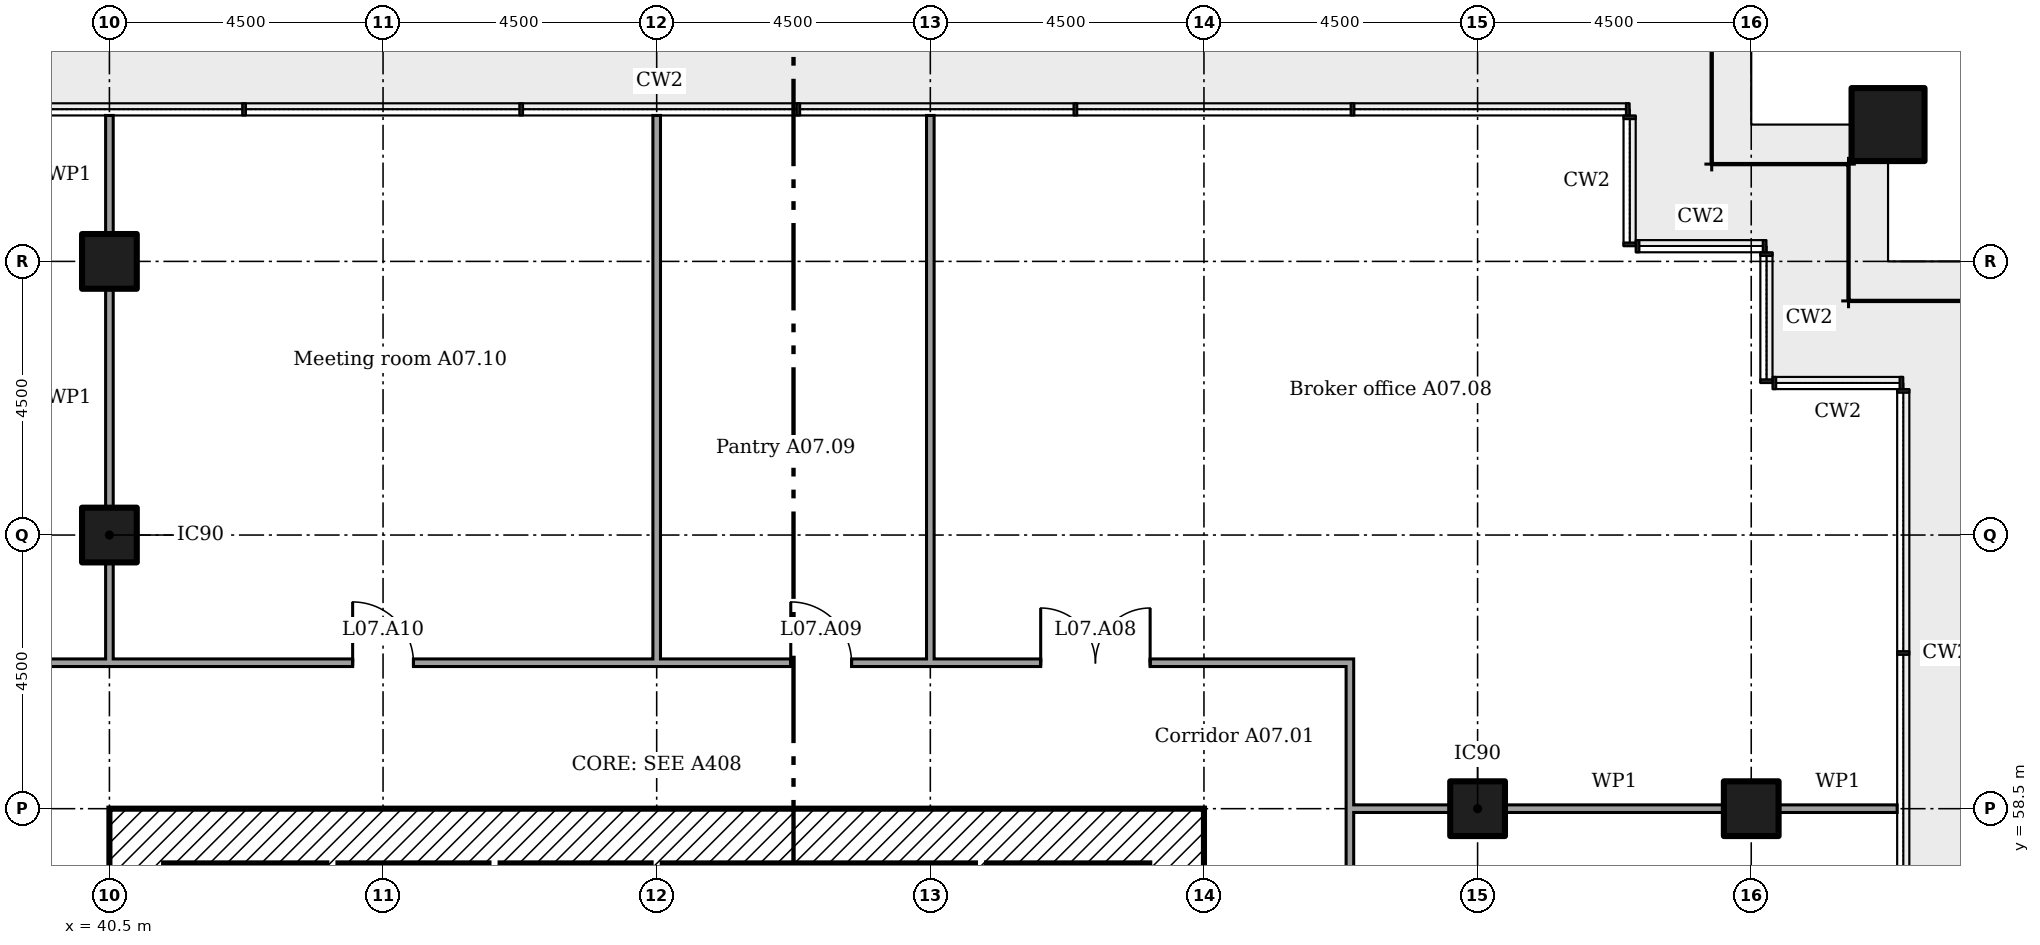
"""IFC4 building model, lengths in metres.
Left out: names, types, materials, properties, quantities, classifications, styles, units other than length and angle.
Written with IfcOpenShell. Run it as: python <this file> out.ifc"""

import sys

from ifc_helpers import new_model, si_unit, direction, frame, frame_2d, origin, origin_2d, place, context, subcontext, project, spatial, rectangle, extrude, element, fill, save


model = new_model("IFC4")
c1 = context("Model", 3, precision=1e-05, world=origin(), true_north=direction((0.0, 1.0)))
c2 = subcontext(c1, "Body", "Model", "MODEL_VIEW")
j1 = project(units=[si_unit("LENGTHUNIT", "METRE"), si_unit("PLANEANGLEUNIT", "RADIAN")], contexts=[c1])
p1 = place(None, origin())
s1 = spatial("IfcSite", under=j1, at=p1, CompositionType="ELEMENT")
p2 = place(p1, origin())
s2 = spatial("IfcBuilding", under=s1, at=p2, CompositionType="ELEMENT")
p3 = place(p2, frame((0.0, 0.0, 34.2)))
s3 = spatial("IfcBuildingStorey", under=s2, at=p3, CompositionType="ELEMENT", Elevation=34.2)
p4 = place(p3, frame((69.75, 69.75, 0.0)))
e1 = element("IfcColumn", 1, at=p4, inside=s3, PredefinedType="COLUMN", context=c2, shape_type="SweptSolid", body=[
    extrude(rectangle(XDim=1.2, YDim=1.2, at=origin_2d()), origin(), (0.0, 0.0, 1.0), 4.4),
])
for number, where in (
    (2, (40.5, 63.0, 0.0)),
    (3, (40.5, 67.5, 0.0)),
    (4, (63.0, 58.5, 0.0)),
    (5, (67.5, 58.5, 0.0)),
):
    element("IfcColumn", number, at=place(p3, frame(where)), inside=s3, PredefinedType="COLUMN", context=c2, shape_type="SweptSolid", body=[
        extrude(rectangle(XDim=0.9, YDim=0.9, at=origin_2d()), origin(), (0.0, 0.0, 1.0), 4.4),
    ])
p5 = place(p3, frame((58.05, 40.5, 0.0), z_axis=(0.0, 0.0, 1.0), x_axis=(0.0, 1.0, 0.0)))
e6 = element("IfcWall", 6, at=p5, inside=s3, PredefinedType="SHEAR", context=c2, shape_type="SweptSolid", body=[
    extrude(rectangle(XDim=18.0, YDim=0.9, at=frame_2d((9.0, 0.0))), origin(), (0.0, 0.0, 1.0), 4.125),
])
p6 = place(p5, frame((13.15, 0.0, 0.0)))
e7 = element("IfcOpeningElement", 7, at=p6, cuts=e6, PredefinedType="OPENING", context=c2, shape_type="SweptSolid", body=[
    extrude(rectangle(XDim=1.2, YDim=2.1, at=frame_2d((0.6, 1.05))), frame((0.0, 0.46, 0.0), z_axis=(0.0, -1.0, 0.0), x_axis=(1.0, 0.0, 0.0)), (0.0, 0.0, 1.0), 0.92),
])
p7 = place(p5, frame((3.9, 0.0, 0.0)))
e8 = element("IfcOpeningElement", 8, at=p7, cuts=e6, PredefinedType="OPENING", context=c2, shape_type="SweptSolid", body=[
    extrude(rectangle(XDim=1.8, YDim=2.1, at=frame_2d((0.9, 1.05))), frame((0.0, 0.46, 0.0), z_axis=(0.0, -1.0, 0.0), x_axis=(1.0, 0.0, 0.0)), (0.0, 0.0, 1.0), 0.92),
])
p8 = place(p5, frame((11.525, 0.0, 0.0)))
e9 = element("IfcOpeningElement", 9, at=p8, cuts=e6, PredefinedType="OPENING", context=c2, shape_type="SweptSolid", body=[
    extrude(rectangle(XDim=1.0, YDim=2.1, at=frame_2d((0.5, 1.05))), frame((0.0, 0.46, 0.0), z_axis=(0.0, -1.0, 0.0), x_axis=(1.0, 0.0, 0.0)), (0.0, 0.0, 1.0), 0.92),
])
p9 = place(p3, frame((41.4, 58.05, 0.0)))
e10 = element("IfcWall", 10, at=p9, inside=s3, PredefinedType="SHEAR", context=c2, shape_type="SweptSolid", body=[
    extrude(rectangle(XDim=16.2, YDim=0.9, at=frame_2d((8.1, 0.0))), origin(), (0.0, 0.0, 1.0), 4.125),
])
p10 = place(p3, frame((40.95, 40.5, 0.0), z_axis=(0.0, 0.0, 1.0), x_axis=(0.0, 1.0, 0.0)))
e11 = element("IfcWall", 11, at=p10, inside=s3, PredefinedType="SHEAR", context=c2, shape_type="SweptSolid", body=[
    extrude(rectangle(XDim=18.0, YDim=0.9, at=frame_2d((9.0, 0.0))), origin(), (0.0, 0.0, 1.0), 4.125),
])
p11 = place(p10, frame((3.65, 0.0, 0.0)))
e12 = element("IfcOpeningElement", 12, at=p11, cuts=e11, PredefinedType="OPENING", context=c2, shape_type="SweptSolid", body=[
    extrude(rectangle(XDim=1.2, YDim=2.1, at=frame_2d((0.6, 1.05))), frame((0.0, 0.46, 0.0), z_axis=(0.0, -1.0, 0.0), x_axis=(1.0, 0.0, 0.0)), (0.0, 0.0, 1.0), 0.92),
])
p12 = place(p10, frame((5.475, 0.0, 0.0)))
e13 = element("IfcOpeningElement", 13, at=p12, cuts=e11, PredefinedType="OPENING", context=c2, shape_type="SweptSolid", body=[
    extrude(rectangle(XDim=1.0, YDim=2.1, at=frame_2d((0.5, 1.05))), frame((0.0, 0.46, 0.0), z_axis=(0.0, -1.0, 0.0), x_axis=(1.0, 0.0, 0.0)), (0.0, 0.0, 1.0), 0.92),
])
p13 = place(p10, frame((12.3, 0.0, 0.0)))
e14 = element("IfcOpeningElement", 14, at=p13, cuts=e11, PredefinedType="OPENING", context=c2, shape_type="SweptSolid", body=[
    extrude(rectangle(XDim=1.0, YDim=2.1, at=frame_2d((0.5, 1.05))), frame((0.0, 0.46, 0.0), z_axis=(0.0, -1.0, 0.0), x_axis=(1.0, 0.0, 0.0)), (0.0, 0.0, 1.0), 0.92),
])
p14 = place(p3, frame((44.167, 57.6, 0.0), z_axis=(0.0, 0.0, 1.0), x_axis=(0.0, -1.0, 0.0)))
e15 = element("IfcWall", 15, at=p14, inside=s3, PredefinedType="SHEAR", context=c2, shape_type="SweptSolid", body=[
    extrude(rectangle(XDim=3.2, YDim=0.2, at=frame_2d((1.6, 0.0))), origin(), (0.0, 0.0, 1.0), 4.125),
])
p15 = place(p3, frame((46.833, 57.6, 0.0), z_axis=(0.0, 0.0, 1.0), x_axis=(0.0, -1.0, 0.0)))
e16 = element("IfcWall", 16, at=p15, inside=s3, PredefinedType="SHEAR", context=c2, shape_type="SweptSolid", body=[
    extrude(rectangle(XDim=4.3, YDim=0.2, at=frame_2d((2.15, 0.0))), origin(), (0.0, 0.0, 1.0), 4.125),
])
for number, where, z_axis, x_axis in (
    (17, (49.5, 57.6, 0.0), (0.0, 0.0, 1.0), (0.0, -1.0, 0.0)),
    (18, (54.833, 57.6, 0.0), (0.0, 0.0, 1.0), (0.0, -1.0, 0.0)),
):
    element("IfcWall", number, at=place(p3, frame(where, z_axis=z_axis, x_axis=x_axis)), inside=s3, PredefinedType="SHEAR", context=c2, shape_type="SweptSolid", body=[
        extrude(rectangle(XDim=2.4, YDim=0.2, at=frame_2d((1.2, 0.0))), origin(), (0.0, 0.0, 1.0), 4.125),
    ])
p16 = place(p3, frame((60.9, 58.5, 0.0)))
e19 = element("IfcWall", 19, at=p16, inside=s3, PredefinedType="PARTITIONING", context=c2, shape_type="SweptSolid", body=[
    extrude(rectangle(XDim=1.65, YDim=0.125, at=frame_2d((0.825, 0.0))), origin(), (0.0, 0.0, 1.0), 3.302),
])
p17 = place(p3, frame((63.45, 58.5, 0.0)))
e20 = element("IfcWall", 20, at=p17, inside=s3, PredefinedType="PARTITIONING", context=c2, shape_type="SweptSolid", body=[
    extrude(rectangle(XDim=3.6, YDim=0.125, at=frame_2d((1.8, 0.0))), origin(), (0.0, 0.0, 1.0), 3.302),
])
p18 = place(p3, frame((67.95, 58.5, 0.0)))
e21 = element("IfcWall", 21, at=p18, inside=s3, PredefinedType="PARTITIONING", context=c2, shape_type="SweptSolid", body=[
    extrude(rectangle(XDim=1.95, YDim=0.125, at=frame_2d((0.975, 0.0))), origin(), (0.0, 0.0, 1.0), 3.302),
])
p19 = place(p3, frame((38.038, 60.9, 0.0)))
e22 = element("IfcWall", 22, at=p19, inside=s3, PredefinedType="PARTITIONING", context=c2, shape_type="SweptSolid", body=[
    extrude(rectangle(XDim=22.925, YDim=0.125, at=frame_2d((11.462, 0.0))), origin(), (0.0, 0.0, 1.0), 4.225),
])
p20 = place(p19, frame((17.778, 0.0, 0.0)))
e23 = element("IfcOpeningElement", 23, at=p20, cuts=e22, PredefinedType="OPENING", context=c2, shape_type="SweptSolid", body=[
    extrude(rectangle(XDim=1.8, YDim=2.1, at=frame_2d((0.9, 1.05))), frame((0.0, 0.073, 0.0), z_axis=(0.0, -1.0, 0.0), x_axis=(1.0, 0.0, 0.0)), (0.0, 0.0, 1.0), 0.145),
])
p21 = place(p19, frame((13.667, 0.0, 0.0)))
e24 = element("IfcOpeningElement", 24, at=p21, cuts=e22, PredefinedType="OPENING", context=c2, shape_type="SweptSolid", body=[
    extrude(rectangle(XDim=1.0, YDim=2.1, at=frame_2d((0.5, 1.05))), frame((0.0, 0.073, 0.0), z_axis=(0.0, -1.0, 0.0), x_axis=(1.0, 0.0, 0.0)), (0.0, 0.0, 1.0), 0.145),
])
p22 = place(p19, frame((6.462, 0.0, 0.0)))
e25 = element("IfcOpeningElement", 25, at=p22, cuts=e22, PredefinedType="OPENING", context=c2, shape_type="SweptSolid", body=[
    extrude(rectangle(XDim=1.0, YDim=2.1, at=frame_2d((0.5, 1.05))), frame((0.0, 0.073, 0.0), z_axis=(0.0, -1.0, 0.0), x_axis=(1.0, 0.0, 0.0)), (0.0, 0.0, 1.0), 0.145),
])
p23 = place(p3, frame((40.5, 60.9, 0.0), z_axis=(0.0, 0.0, 1.0), x_axis=(0.0, 1.0, 0.0)))
e26 = element("IfcWall", 26, at=p23, inside=s3, PredefinedType="PARTITIONING", context=c2, shape_type="SweptSolid", body=[
    extrude(rectangle(XDim=1.65, YDim=0.125, at=frame_2d((0.825, 0.0))), origin(), (0.0, 0.0, 1.0), 3.302),
])
p24 = place(p3, frame((40.5, 63.45, 0.0), z_axis=(0.0, 0.0, 1.0), x_axis=(0.0, 1.0, 0.0)))
e27 = element("IfcWall", 27, at=p24, inside=s3, PredefinedType="PARTITIONING", context=c2, shape_type="SweptSolid", body=[
    extrude(rectangle(XDim=3.6, YDim=0.125, at=frame_2d((1.8, 0.0))), origin(), (0.0, 0.0, 1.0), 3.302),
])
p25 = place(p3, frame((40.5, 67.95, 0.0), z_axis=(0.0, 0.0, 1.0), x_axis=(0.0, 1.0, 0.0)))
e28 = element("IfcWall", 28, at=p25, inside=s3, PredefinedType="PARTITIONING", context=c2, shape_type="SweptSolid", body=[
    extrude(rectangle(XDim=1.95, YDim=0.125, at=frame_2d((0.975, 0.0))), origin(), (0.0, 0.0, 1.0), 3.302),
])
for number, where, z_axis, x_axis in (
    (29, (49.5, 60.9, 0.0), (0.0, 0.0, 1.0), (0.0, 1.0, 0.0)),
    (30, (54.0, 60.9, 0.0), (0.0, 0.0, 1.0), (0.0, 1.0, 0.0)),
):
    element("IfcWall", number, at=place(p3, frame(where, z_axis=z_axis, x_axis=x_axis)), inside=s3, PredefinedType="PARTITIONING", context=c2, shape_type="SweptSolid", body=[
        extrude(rectangle(XDim=9.0, YDim=0.125, at=frame_2d((4.5, 0.0))), origin(), (0.0, 0.0, 1.0), 3.467),
    ])
p26 = place(p3, frame((60.9, 37.863, 0.0), z_axis=(0.0, 0.0, 1.0), x_axis=(0.0, 1.0, 0.0)))
e31 = element("IfcWall", 31, at=p26, inside=s3, PredefinedType="PARTITIONING", context=c2, shape_type="SweptSolid", body=[
    extrude(rectangle(XDim=22.975, YDim=0.125, at=frame_2d((11.487, 0.0))), origin(), (0.0, 0.0, 1.0), 4.225),
])
p27 = place(p26, frame((3.933, 0.0, 0.0)))
e32 = element("IfcOpeningElement", 32, at=p27, cuts=e31, PredefinedType="OPENING", context=c2, shape_type="SweptSolid", body=[
    extrude(rectangle(XDim=1.0, YDim=2.1, at=frame_2d((0.5, 1.05))), frame((0.0, 0.073, 0.0), z_axis=(0.0, -1.0, 0.0), x_axis=(1.0, 0.0, 0.0)), (0.0, 0.0, 1.0), 0.145),
])
p28 = place(p26, frame((9.343, 0.0, 0.0)))
e33 = element("IfcOpeningElement", 33, at=p28, cuts=e31, PredefinedType="OPENING", context=c2, shape_type="SweptSolid", body=[
    extrude(rectangle(XDim=1.0, YDim=2.1, at=frame_2d((0.5, 1.05))), frame((0.0, 0.073, 0.0), z_axis=(0.0, -1.0, 0.0), x_axis=(1.0, 0.0, 0.0)), (0.0, 0.0, 1.0), 0.145),
])
p29 = place(p26, frame((15.637, 0.0, 0.0)))
e34 = element("IfcOpeningElement", 34, at=p29, cuts=e31, PredefinedType="OPENING", context=c2, shape_type="SweptSolid", body=[
    extrude(rectangle(XDim=1.0, YDim=2.1, at=frame_2d((0.5, 1.05))), frame((0.0, 0.073, 0.0), z_axis=(0.0, -1.0, 0.0), x_axis=(1.0, 0.0, 0.0)), (0.0, 0.0, 1.0), 0.145),
])
p30 = place(p20, origin())
e35 = element("IfcDoor", 35, at=p30, inside=s3, OperationType="DOUBLE_DOOR_SINGLE_SWING", PredefinedType="DOOR", context=c2, shape_type="SweptSolid", body=[
    extrude(rectangle(XDim=1.8, YDim=2.1, at=frame_2d((0.9, 1.05))), frame((0.0, 0.025, 0.0), z_axis=(0.0, -1.0, 0.0), x_axis=(1.0, 0.0, 0.0)), (0.0, 0.0, 1.0), 0.05),
])
fill(e23, e35)
p31 = place(p21, origin())
e36 = element("IfcDoor", 36, at=p31, inside=s3, OperationType="SINGLE_SWING_RIGHT", PredefinedType="DOOR", context=c2, shape_type="SweptSolid", body=[
    extrude(rectangle(XDim=1.0, YDim=2.1, at=frame_2d((0.5, 1.05))), frame((0.0, 0.025, 0.0), z_axis=(0.0, -1.0, 0.0), x_axis=(1.0, 0.0, 0.0)), (0.0, 0.0, 1.0), 0.05),
])
fill(e24, e36)
p32 = place(p22, origin())
e37 = element("IfcDoor", 37, at=p32, inside=s3, OperationType="SINGLE_SWING_RIGHT", PredefinedType="DOOR", context=c2, shape_type="SweptSolid", body=[
    extrude(rectangle(XDim=1.0, YDim=2.1, at=frame_2d((0.5, 1.05))), frame((0.0, 0.025, 0.0), z_axis=(0.0, -1.0, 0.0), x_axis=(1.0, 0.0, 0.0)), (0.0, 0.0, 1.0), 0.05),
])
fill(e25, e37)
save(model, sys.argv[1])
